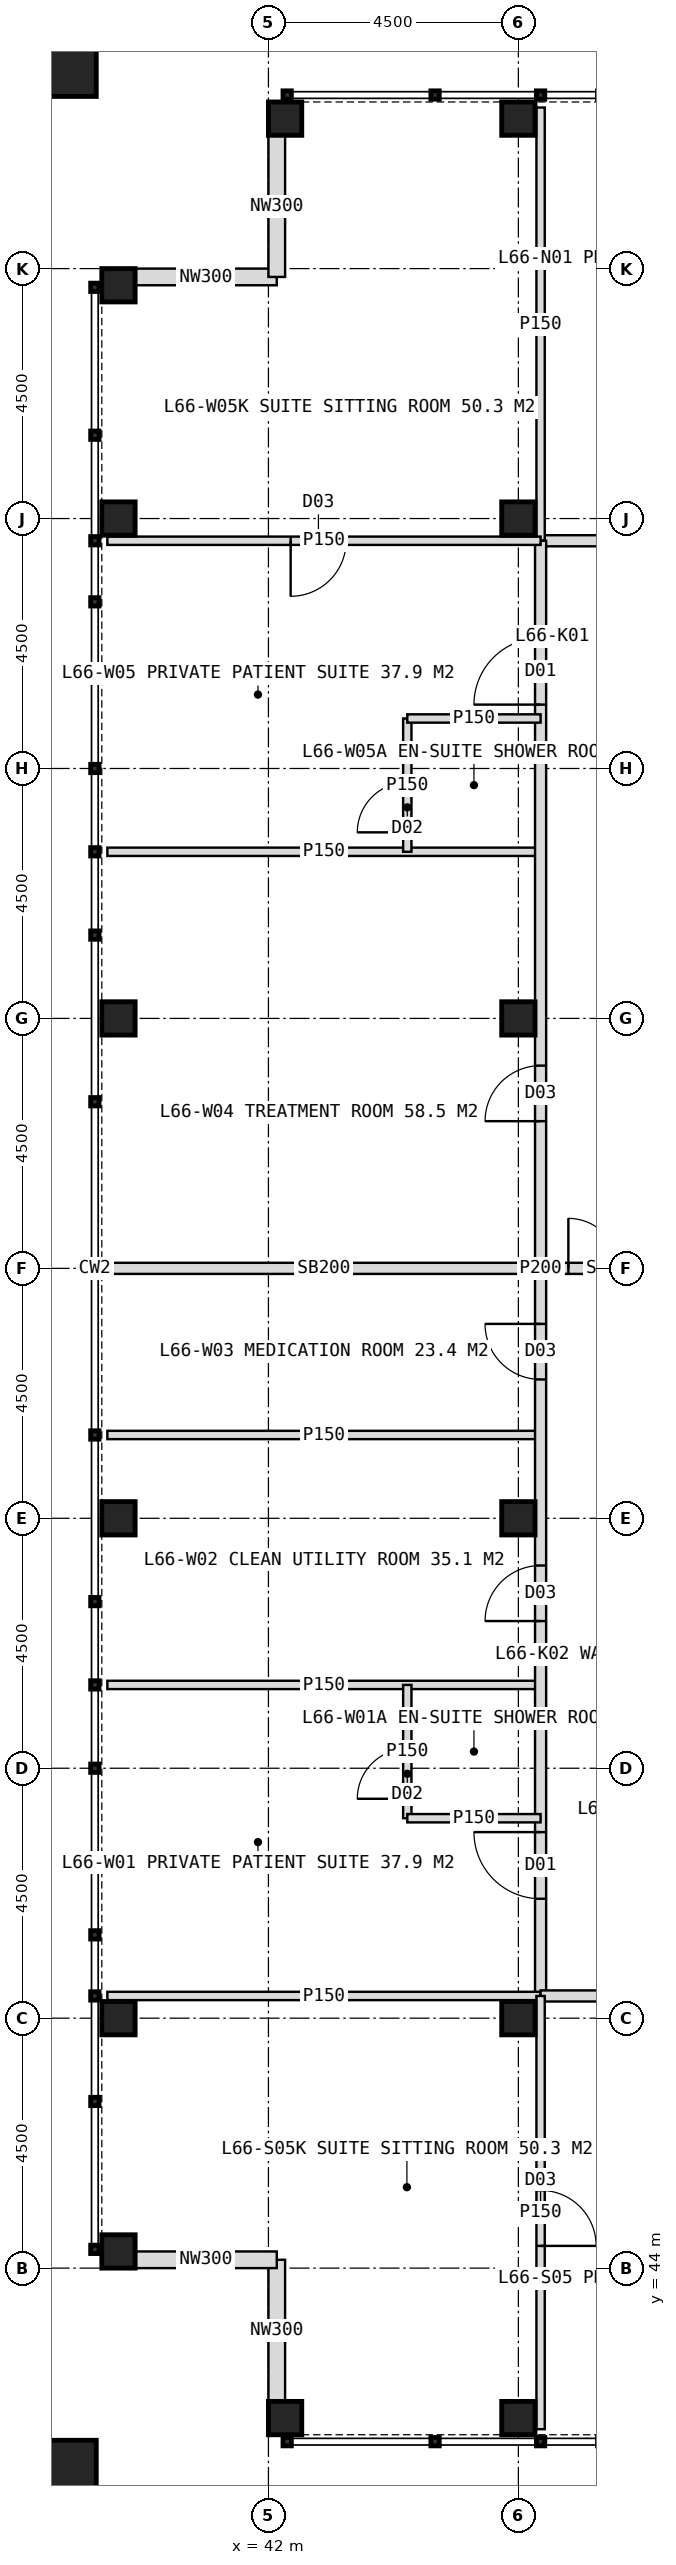
"""IFC4 building model, lengths in metres.
Left out: names, types, materials, properties, quantities, classifications, styles, units other than length and angle.
Written with IfcOpenShell. Run it as: python <this file> out.ifc"""

import sys

from ifc_helpers import new_model, si_unit, direction, frame, frame_2d, origin, origin_2d, place, context, subcontext, project, spatial, rectangle, hollow_rectangle, extrude, element, fill, save


model = new_model("IFC4")
c1 = context("Model", 3, precision=1e-05, world=origin(), true_north=direction((0.0, 1.0)))
c2 = subcontext(c1, "Body", "Model", "MODEL_VIEW")
j1 = project(units=[si_unit("LENGTHUNIT", "METRE"), si_unit("PLANEANGLEUNIT", "RADIAN")], contexts=[c1])
p1 = place(None, origin())
s1 = spatial("IfcSite", under=j1, at=p1, CompositionType="ELEMENT")
p2 = place(p1, origin())
s2 = spatial("IfcBuilding", under=s1, at=p2, CompositionType="ELEMENT")
p3 = place(p2, frame((0.0, 0.0, 274.0)))
s3 = spatial("IfcBuildingStorey", under=s2, at=p3, CompositionType="ELEMENT", Elevation=274.0)
for number, where, z_axis, x_axis in (
    (1, (46.5, 48.5, 0.0), (0.0, 0.0, 1.0), (1.0, 0.0, 0.0)),
    (2, (46.5, 75.5, 0.0), (0.0, 0.0, 1.0), (1.0, 0.0, 0.0)),
    (3, (46.5, 57.5, 0.0), (0.0, 0.0, 1.0), (1.0, 0.0, 0.0)),
    (4, (46.5, 66.5, 0.0), (0.0, 0.0, 1.0), (1.0, 0.0, 0.0)),
    (5, (42.3, 41.3, 0.0), (0.0, 0.0, 1.0), (1.0, 0.0, 0.0)),
    (6, (42.3, 82.7, 0.0), (0.0, 0.0, 1.0), (1.0, 0.0, 0.0)),
    (7, (39.3, 44.3, 0.0), (0.0, 0.0, 1.0), (1.0, 0.0, 0.0)),
    (8, (46.5, 41.3, 0.0), (0.0, 0.0, 1.0), (1.0, 0.0, 0.0)),
    (9, (46.5, 82.7, 0.0), (0.0, 0.0, 1.0), (1.0, 0.0, 0.0)),
    (10, (39.3, 48.5, 0.0), (0.0, 0.0, 1.0), (1.0, 0.0, 0.0)),
    (11, (39.3, 57.5, 0.0), (0.0, 0.0, 1.0), (1.0, 0.0, 0.0)),
    (12, (39.3, 66.5, 0.0), (0.0, 0.0, 1.0), (1.0, 0.0, 0.0)),
    (13, (39.3, 75.5, 0.0), (0.0, 0.0, 1.0), (1.0, 0.0, 0.0)),
    (14, (39.3, 79.7, 0.0), (0.0, 0.0, 1.0), (1.0, 0.0, 0.0)),
):
    element("IfcColumn", number, at=place(p3, frame(where, z_axis=z_axis, x_axis=x_axis)), inside=s3, PredefinedType="COLUMN", context=c2, shape_type="SweptSolid", body=[
        extrude(hollow_rectangle(XDim=0.6, YDim=0.6, WallThickness=0.04, at=origin_2d()), origin(), (0.0, 0.0, 1.0), 4.0),
    ])
for number, where, z_axis, x_axis in (
    (15, (38.4, 40.4, 0.0), (0.0, 0.0, 1.0), (1.0, 0.0, 0.0)),
    (16, (38.4, 83.6, 0.0), (0.0, 0.0, 1.0), (1.0, 0.0, 0.0)),
):
    element("IfcColumn", number, at=place(p3, frame(where, z_axis=z_axis, x_axis=x_axis)), inside=s3, PredefinedType="COLUMN", context=c2, shape_type="SweptSolid", body=[
        extrude(hollow_rectangle(XDim=1.0, YDim=1.0, WallThickness=0.06, at=origin_2d()), origin(), (0.0, 0.0, 1.0), 4.0),
    ])
for number, where, z_axis, x_axis in (
    (17, (39.6, 79.85, 0.0), (0.0, 0.0, 1.0), (1.0, 0.0, 0.0)),
    (18, (42.15, 79.85, 0.0), (0.0, 0.0, 1.0), (0.0, 1.0, 0.0)),
    (19, (42.15, 41.6, 0.0), (0.0, 0.0, 1.0), (0.0, 1.0, 0.0)),
    (20, (42.15, 44.15, 0.0), (0.0, 0.0, 1.0), (-1.0, 0.0, 0.0)),
):
    element("IfcWall", number, at=place(p3, frame(where, z_axis=z_axis, x_axis=x_axis)), inside=s3, PredefinedType="ELEMENTEDWALL", context=c2, shape_type="SweptSolid", body=[
        extrude(rectangle(XDim=2.55, YDim=0.3, at=frame_2d((1.275, 0.0))), origin(), (0.0, 0.0, 1.0), 2.95),
    ])
p4 = place(p3, frame((46.9, 75.1, 0.0), z_axis=(0.0, 0.0, 1.0), x_axis=(1.0, 0.0, 0.0)))
e21 = element("IfcWall", 21, at=p4, inside=s3, PredefinedType="PARTITIONING", context=c2, shape_type="SweptSolid", body=[
    extrude(rectangle(XDim=26.2, YDim=0.2, at=frame_2d((13.1, 0.0))), origin(), (0.0, 0.0, 1.0), 3.75),
])
p5 = place(p4, frame((1.75, 0.0, 0.0)))
e22 = element("IfcOpeningElement", 22, at=p5, cuts=e21, PredefinedType="OPENING", context=c2, shape_type="SweptSolid", body=[
    extrude(rectangle(XDim=1.2, YDim=2.2, at=frame_2d((0.6, 1.1))), frame((0.0, 0.11, 0.0), z_axis=(0.0, -1.0, 0.0), x_axis=(1.0, 0.0, 0.0)), (0.0, 0.0, 1.0), 0.22),
])
p6 = place(p4, frame((6.75, 0.0, 0.0)))
e23 = element("IfcOpeningElement", 23, at=p6, cuts=e21, PredefinedType="OPENING", context=c2, shape_type="SweptSolid", body=[
    extrude(rectangle(XDim=1.0, YDim=2.1, at=frame_2d((0.5, 1.05))), frame((0.0, 0.11, 0.0), z_axis=(0.0, -1.0, 0.0), x_axis=(1.0, 0.0, 0.0)), (0.0, 0.0, 1.0), 0.22),
])
p7 = place(p4, frame((12.75, 0.0, 0.0)))
e24 = element("IfcOpeningElement", 24, at=p7, cuts=e21, PredefinedType="OPENING", context=c2, shape_type="SweptSolid", body=[
    extrude(rectangle(XDim=1.2, YDim=2.2, at=frame_2d((0.6, 1.1))), frame((0.0, 0.11, 0.0), z_axis=(0.0, -1.0, 0.0), x_axis=(1.0, 0.0, 0.0)), (0.0, 0.0, 1.0), 0.22),
])
p8 = place(p4, frame((18.45, 0.0, 0.0)))
e25 = element("IfcOpeningElement", 25, at=p8, cuts=e21, PredefinedType="OPENING", context=c2, shape_type="SweptSolid", body=[
    extrude(rectangle(XDim=1.0, YDim=2.1, at=frame_2d((0.5, 1.05))), frame((0.0, 0.11, 0.0), z_axis=(0.0, -1.0, 0.0), x_axis=(1.0, 0.0, 0.0)), (0.0, 0.0, 1.0), 0.22),
])
p9 = place(p4, frame((23.25, 0.0, 0.0)))
e26 = element("IfcOpeningElement", 26, at=p9, cuts=e21, PredefinedType="OPENING", context=c2, shape_type="SweptSolid", body=[
    extrude(rectangle(XDim=1.2, YDim=2.2, at=frame_2d((0.6, 1.1))), frame((0.0, 0.11, 0.0), z_axis=(0.0, -1.0, 0.0), x_axis=(1.0, 0.0, 0.0)), (0.0, 0.0, 1.0), 0.22),
])
for number, where, z_axis, x_axis in (
    (27, (46.9, 75.1, 0.0), (0.0, 0.0, 1.0), (0.0, 1.0, 0.0)),
    (28, (46.9, 54.5, 0.0), (0.0, 0.0, 1.0), (-1.0, 0.0, 0.0)),
    (29, (46.9, 59.0, 0.0), (0.0, 0.0, 1.0), (-1.0, 0.0, 0.0)),
):
    element("IfcWall", number, at=place(p3, frame(where, z_axis=z_axis, x_axis=x_axis)), inside=s3, PredefinedType="PARTITIONING", context=c2, shape_type="SweptSolid", body=[
        extrude(rectangle(XDim=7.8, YDim=0.15, at=frame_2d((3.9, 0.0))), origin(), (0.0, 0.0, 1.0), 3.75),
    ])
p10 = place(p3, frame((46.9, 62.0, 0.0), z_axis=(0.0, 0.0, 1.0), x_axis=(-1.0, 0.0, 0.0)))
e30 = element("IfcWall", 30, at=p10, inside=s3, PredefinedType="SOLIDWALL", context=c2, shape_type="SweptSolid", body=[
    extrude(rectangle(XDim=7.8, YDim=0.2, at=frame_2d((3.9, 0.0))), origin(), (0.0, 0.0, 1.0), 2.75),
])
p11 = place(p3, frame((46.9, 69.5, 0.0), z_axis=(0.0, 0.0, 1.0), x_axis=(-1.0, 0.0, 0.0)))
e31 = element("IfcWall", 31, at=p11, inside=s3, PredefinedType="PARTITIONING", context=c2, shape_type="SweptSolid", body=[
    extrude(rectangle(XDim=7.8, YDim=0.15, at=frame_2d((3.9, 0.0))), origin(), (0.0, 0.0, 1.0), 3.75),
])
p12 = place(p3, frame((46.9, 48.9, 0.0), z_axis=(0.0, 0.0, 1.0), x_axis=(0.0, 1.0, 0.0)))
e32 = element("IfcWall", 32, at=p12, inside=s3, PredefinedType="PARTITIONING", context=c2, shape_type="SweptSolid", body=[
    extrude(rectangle(XDim=26.2, YDim=0.2, at=frame_2d((13.1, 0.0))), origin(), (0.0, 0.0, 1.0), 3.75),
])
p13 = place(p12, frame((1.75, 0.0, 0.0)))
e33 = element("IfcOpeningElement", 33, at=p13, cuts=e32, PredefinedType="OPENING", context=c2, shape_type="SweptSolid", body=[
    extrude(rectangle(XDim=1.2, YDim=2.2, at=frame_2d((0.6, 1.1))), frame((0.0, 0.11, 0.0), z_axis=(0.0, -1.0, 0.0), x_axis=(1.0, 0.0, 0.0)), (0.0, 0.0, 1.0), 0.22),
])
p14 = place(p12, frame((6.75, 0.0, 0.0)))
e34 = element("IfcOpeningElement", 34, at=p14, cuts=e32, PredefinedType="OPENING", context=c2, shape_type="SweptSolid", body=[
    extrude(rectangle(XDim=1.0, YDim=2.1, at=frame_2d((0.5, 1.05))), frame((0.0, 0.11, 0.0), z_axis=(0.0, -1.0, 0.0), x_axis=(1.0, 0.0, 0.0)), (0.0, 0.0, 1.0), 0.22),
])
p15 = place(p12, frame((11.1, 0.0, 0.0)))
e35 = element("IfcOpeningElement", 35, at=p15, cuts=e32, PredefinedType="OPENING", context=c2, shape_type="SweptSolid", body=[
    extrude(rectangle(XDim=1.0, YDim=2.1, at=frame_2d((0.5, 1.05))), frame((0.0, 0.11, 0.0), z_axis=(0.0, -1.0, 0.0), x_axis=(1.0, 0.0, 0.0)), (0.0, 0.0, 1.0), 0.22),
])
p16 = place(p12, frame((15.75, 0.0, 0.0)))
e36 = element("IfcOpeningElement", 36, at=p16, cuts=e32, PredefinedType="OPENING", context=c2, shape_type="SweptSolid", body=[
    extrude(rectangle(XDim=1.0, YDim=2.1, at=frame_2d((0.5, 1.05))), frame((0.0, 0.11, 0.0), z_axis=(0.0, -1.0, 0.0), x_axis=(1.0, 0.0, 0.0)), (0.0, 0.0, 1.0), 0.22),
])
p17 = place(p12, frame((23.25, 0.0, 0.0)))
e37 = element("IfcOpeningElement", 37, at=p17, cuts=e32, PredefinedType="OPENING", context=c2, shape_type="SweptSolid", body=[
    extrude(rectangle(XDim=1.2, YDim=2.2, at=frame_2d((0.6, 1.1))), frame((0.0, 0.11, 0.0), z_axis=(0.0, -1.0, 0.0), x_axis=(1.0, 0.0, 0.0)), (0.0, 0.0, 1.0), 0.22),
])
p18 = place(p3, frame((46.9, 48.9, 0.0), z_axis=(0.0, 0.0, 1.0), x_axis=(-1.0, 0.0, 0.0)))
e38 = element("IfcWall", 38, at=p18, inside=s3, PredefinedType="PARTITIONING", context=c2, shape_type="SweptSolid", body=[
    extrude(rectangle(XDim=7.8, YDim=0.15, at=frame_2d((3.9, 0.0))), origin(), (0.0, 0.0, 1.0), 3.75),
])
p19 = place(p3, frame((44.5, 52.1, 0.0), z_axis=(0.0, 0.0, 1.0), x_axis=(0.0, 1.0, 0.0)))
e39 = element("IfcWall", 39, at=p19, inside=s3, PredefinedType="PARTITIONING", context=c2, shape_type="SweptSolid", body=[
    extrude(rectangle(XDim=2.4, YDim=0.15, at=frame_2d((1.2, 0.0))), origin(), (0.0, 0.0, 1.0), 3.75),
])
p20 = place(p19, frame((0.35, 0.0, 0.0)))
e40 = element("IfcOpeningElement", 40, at=p20, cuts=e39, PredefinedType="OPENING", context=c2, shape_type="SweptSolid", body=[
    extrude(rectangle(XDim=0.9, YDim=2.1, at=frame_2d((0.45, 1.05))), frame((0.0, 0.085, 0.0), z_axis=(0.0, -1.0, 0.0), x_axis=(1.0, 0.0, 0.0)), (0.0, 0.0, 1.0), 0.17),
])
p21 = place(p3, frame((46.9, 52.1, 0.0), z_axis=(0.0, 0.0, 1.0), x_axis=(-1.0, 0.0, 0.0)))
e41 = element("IfcWall", 41, at=p21, inside=s3, PredefinedType="PARTITIONING", context=c2, shape_type="SweptSolid", body=[
    extrude(rectangle(XDim=2.4, YDim=0.15, at=frame_2d((1.2, 0.0))), origin(), (0.0, 0.0, 1.0), 3.75),
])
p22 = place(p3, frame((46.9, 75.1, 0.0), z_axis=(0.0, 0.0, 1.0), x_axis=(-1.0, 0.0, 0.0)))
e42 = element("IfcWall", 42, at=p22, inside=s3, PredefinedType="PARTITIONING", context=c2, shape_type="SweptSolid", body=[
    extrude(rectangle(XDim=7.8, YDim=0.15, at=frame_2d((3.9, 0.0))), origin(), (0.0, 0.0, 1.0), 3.75),
])
p23 = place(p22, frame((3.5, 0.0, 0.0)))
e43 = element("IfcOpeningElement", 43, at=p23, cuts=e42, PredefinedType="OPENING", context=c2, shape_type="SweptSolid", body=[
    extrude(rectangle(XDim=1.0, YDim=2.1, at=frame_2d((0.5, 1.05))), frame((0.0, 0.085, 0.0), z_axis=(0.0, -1.0, 0.0), x_axis=(1.0, 0.0, 0.0)), (0.0, 0.0, 1.0), 0.17),
])
p24 = place(p3, frame((44.5, 69.5, 0.0), z_axis=(0.0, 0.0, 1.0), x_axis=(0.0, 1.0, 0.0)))
e44 = element("IfcWall", 44, at=p24, inside=s3, PredefinedType="PARTITIONING", context=c2, shape_type="SweptSolid", body=[
    extrude(rectangle(XDim=2.4, YDim=0.15, at=frame_2d((1.2, 0.0))), origin(), (0.0, 0.0, 1.0), 3.75),
])
p25 = place(p24, frame((0.35, 0.0, 0.0)))
e45 = element("IfcOpeningElement", 45, at=p25, cuts=e44, PredefinedType="OPENING", context=c2, shape_type="SweptSolid", body=[
    extrude(rectangle(XDim=0.9, YDim=2.1, at=frame_2d((0.45, 1.05))), frame((0.0, 0.085, 0.0), z_axis=(0.0, -1.0, 0.0), x_axis=(1.0, 0.0, 0.0)), (0.0, 0.0, 1.0), 0.17),
])
p26 = place(p3, frame((46.9, 71.9, 0.0), z_axis=(0.0, 0.0, 1.0), x_axis=(-1.0, 0.0, 0.0)))
e46 = element("IfcWall", 46, at=p26, inside=s3, PredefinedType="PARTITIONING", context=c2, shape_type="SweptSolid", body=[
    extrude(rectangle(XDim=2.4, YDim=0.15, at=frame_2d((1.2, 0.0))), origin(), (0.0, 0.0, 1.0), 3.75),
])
p27 = place(p3, frame((73.1, 48.9, 0.0), z_axis=(0.0, 0.0, 1.0), x_axis=(-1.0, 0.0, 0.0)))
e47 = element("IfcWall", 47, at=p27, inside=s3, PredefinedType="PARTITIONING", context=c2, shape_type="SweptSolid", body=[
    extrude(rectangle(XDim=26.2, YDim=0.2, at=frame_2d((13.1, 0.0))), origin(), (0.0, 0.0, 1.0), 3.75),
])
p28 = place(p27, frame((1.55, 0.0, 0.0)))
e48 = element("IfcOpeningElement", 48, at=p28, cuts=e47, PredefinedType="OPENING", context=c2, shape_type="SweptSolid", body=[
    extrude(rectangle(XDim=1.0, YDim=2.1, at=frame_2d((0.5, 1.05))), frame((0.0, 0.11, 0.0), z_axis=(0.0, -1.0, 0.0), x_axis=(1.0, 0.0, 0.0)), (0.0, 0.0, 1.0), 0.22),
])
p29 = place(p27, frame((6.75, 0.0, 0.0)))
e49 = element("IfcOpeningElement", 49, at=p29, cuts=e47, PredefinedType="OPENING", context=c2, shape_type="SweptSolid", body=[
    extrude(rectangle(XDim=1.0, YDim=2.1, at=frame_2d((0.5, 1.05))), frame((0.0, 0.11, 0.0), z_axis=(0.0, -1.0, 0.0), x_axis=(1.0, 0.0, 0.0)), (0.0, 0.0, 1.0), 0.22),
])
p30 = place(p27, frame((14.25, 0.0, 0.0)))
e50 = element("IfcOpeningElement", 50, at=p30, cuts=e47, PredefinedType="OPENING", context=c2, shape_type="SweptSolid", body=[
    extrude(rectangle(XDim=1.2, YDim=2.2, at=frame_2d((0.6, 1.1))), frame((0.0, 0.11, 0.0), z_axis=(0.0, -1.0, 0.0), x_axis=(1.0, 0.0, 0.0)), (0.0, 0.0, 1.0), 0.22),
])
p31 = place(p27, frame((18.45, 0.0, 0.0)))
e51 = element("IfcOpeningElement", 51, at=p31, cuts=e47, PredefinedType="OPENING", context=c2, shape_type="SweptSolid", body=[
    extrude(rectangle(XDim=1.0, YDim=2.1, at=frame_2d((0.5, 1.05))), frame((0.0, 0.11, 0.0), z_axis=(0.0, -1.0, 0.0), x_axis=(1.0, 0.0, 0.0)), (0.0, 0.0, 1.0), 0.22),
])
p32 = place(p27, frame((23.25, 0.0, 0.0)))
e52 = element("IfcOpeningElement", 52, at=p32, cuts=e47, PredefinedType="OPENING", context=c2, shape_type="SweptSolid", body=[
    extrude(rectangle(XDim=1.2, YDim=2.2, at=frame_2d((0.6, 1.1))), frame((0.0, 0.11, 0.0), z_axis=(0.0, -1.0, 0.0), x_axis=(1.0, 0.0, 0.0)), (0.0, 0.0, 1.0), 0.22),
])
p33 = place(p3, frame((46.9, 48.9, 0.0), z_axis=(0.0, 0.0, 1.0), x_axis=(0.0, -1.0, 0.0)))
e53 = element("IfcWall", 53, at=p33, inside=s3, PredefinedType="PARTITIONING", context=c2, shape_type="SweptSolid", body=[
    extrude(rectangle(XDim=7.8, YDim=0.15, at=frame_2d((3.9, 0.0))), origin(), (0.0, 0.0, 1.0), 3.75),
])
p34 = place(p33, frame((3.5, 0.0, 0.0)))
e54 = element("IfcOpeningElement", 54, at=p34, cuts=e53, PredefinedType="OPENING", context=c2, shape_type="SweptSolid", body=[
    extrude(rectangle(XDim=1.0, YDim=2.1, at=frame_2d((0.5, 1.05))), frame((0.0, 0.085, 0.0), z_axis=(0.0, -1.0, 0.0), x_axis=(1.0, 0.0, 0.0)), (0.0, 0.0, 1.0), 0.17),
])
p35 = place(p3, frame((49.5, 62.0, 0.0), z_axis=(0.0, 0.0, 1.0), x_axis=(-1.0, 0.0, 0.0)))
e55 = element("IfcWall", 55, at=p35, inside=s3, PredefinedType="SOLIDWALL", context=c2, shape_type="SweptSolid", body=[
    extrude(rectangle(XDim=2.6, YDim=0.2, at=frame_2d((1.3, 0.0))), origin(), (0.0, 0.0, 1.0), 2.75),
])
p36 = place(p35, frame((0.3, 0.0, 0.0)))
e56 = element("IfcOpeningElement", 56, at=p36, cuts=e55, PredefinedType="OPENING", context=c2, shape_type="SweptSolid", body=[
    extrude(rectangle(XDim=1.8, YDim=2.2, at=frame_2d((0.9, 1.1))), frame((0.0, 0.11, 0.0), z_axis=(0.0, -1.0, 0.0), x_axis=(1.0, 0.0, 0.0)), (0.0, 0.0, 1.0), 0.22),
])
p37 = place(p13, origin())
e57 = element("IfcDoor", 57, at=p37, inside=s3, OperationType="SINGLE_SWING_RIGHT", PredefinedType="DOOR", context=c2, shape_type="SweptSolid", body=[
    extrude(rectangle(XDim=1.2, YDim=2.2, at=frame_2d((0.6, 1.1))), frame((0.0, 0.025, 0.0), z_axis=(0.0, -1.0, 0.0), x_axis=(1.0, 0.0, 0.0)), (0.0, 0.0, 1.0), 0.05),
])
fill(e33, e57)
p38 = place(p20, origin())
e58 = element("IfcDoor", 58, at=p38, inside=s3, OperationType="SINGLE_SWING_LEFT", PredefinedType="DOOR", context=c2, shape_type="SweptSolid", body=[
    extrude(rectangle(XDim=0.9, YDim=2.1, at=frame_2d((0.45, 1.05))), frame((0.0, 0.025, 0.0), z_axis=(0.0, -1.0, 0.0), x_axis=(1.0, 0.0, 0.0)), (0.0, 0.0, 1.0), 0.05),
])
fill(e40, e58)
p39 = place(p14, origin())
e59 = element("IfcDoor", 59, at=p39, inside=s3, OperationType="SINGLE_SWING_LEFT", PredefinedType="DOOR", context=c2, shape_type="SweptSolid", body=[
    extrude(rectangle(XDim=1.0, YDim=2.1, at=frame_2d((0.5, 1.05))), frame((0.0, 0.025, 0.0), z_axis=(0.0, -1.0, 0.0), x_axis=(1.0, 0.0, 0.0)), (0.0, 0.0, 1.0), 0.05),
])
fill(e34, e59)
p40 = place(p15, origin())
e60 = element("IfcDoor", 60, at=p40, inside=s3, OperationType="SINGLE_SWING_RIGHT", PredefinedType="DOOR", context=c2, shape_type="SweptSolid", body=[
    extrude(rectangle(XDim=1.0, YDim=2.1, at=frame_2d((0.5, 1.05))), frame((0.0, 0.025, 0.0), z_axis=(0.0, -1.0, 0.0), x_axis=(1.0, 0.0, 0.0)), (0.0, 0.0, 1.0), 0.05),
])
fill(e35, e60)
p41 = place(p16, origin())
e61 = element("IfcDoor", 61, at=p41, inside=s3, OperationType="SINGLE_SWING_LEFT", PredefinedType="DOOR", context=c2, shape_type="SweptSolid", body=[
    extrude(rectangle(XDim=1.0, YDim=2.1, at=frame_2d((0.5, 1.05))), frame((0.0, 0.025, 0.0), z_axis=(0.0, -1.0, 0.0), x_axis=(1.0, 0.0, 0.0)), (0.0, 0.0, 1.0), 0.05),
])
fill(e36, e61)
p42 = place(p23, origin())
e62 = element("IfcDoor", 62, at=p42, inside=s3, OperationType="SINGLE_SWING_RIGHT", PredefinedType="DOOR", context=c2, shape_type="SweptSolid", body=[
    extrude(rectangle(XDim=1.0, YDim=2.1, at=frame_2d((0.5, 1.05))), frame((0.0, 0.025, 0.0), z_axis=(0.0, -1.0, 0.0), x_axis=(1.0, 0.0, 0.0)), (0.0, 0.0, 1.0), 0.05),
])
fill(e43, e62)
p43 = place(p17, origin())
e63 = element("IfcDoor", 63, at=p43, inside=s3, OperationType="SINGLE_SWING_LEFT", PredefinedType="DOOR", context=c2, shape_type="SweptSolid", body=[
    extrude(rectangle(XDim=1.2, YDim=2.2, at=frame_2d((0.6, 1.1))), frame((0.0, 0.025, 0.0), z_axis=(0.0, -1.0, 0.0), x_axis=(1.0, 0.0, 0.0)), (0.0, 0.0, 1.0), 0.05),
])
fill(e37, e63)
p44 = place(p25, origin())
e64 = element("IfcDoor", 64, at=p44, inside=s3, OperationType="SINGLE_SWING_LEFT", PredefinedType="DOOR", context=c2, shape_type="SweptSolid", body=[
    extrude(rectangle(XDim=0.9, YDim=2.1, at=frame_2d((0.45, 1.05))), frame((0.0, 0.025, 0.0), z_axis=(0.0, -1.0, 0.0), x_axis=(1.0, 0.0, 0.0)), (0.0, 0.0, 1.0), 0.05),
])
fill(e45, e64)
p45 = place(p34, origin())
e65 = element("IfcDoor", 65, at=p45, inside=s3, OperationType="SINGLE_SWING_RIGHT", PredefinedType="DOOR", context=c2, shape_type="SweptSolid", body=[
    extrude(rectangle(XDim=1.0, YDim=2.1, at=frame_2d((0.5, 1.05))), frame((0.0, 0.025, 0.0), z_axis=(0.0, -1.0, 0.0), x_axis=(1.0, 0.0, 0.0)), (0.0, 0.0, 1.0), 0.05),
])
fill(e54, e65)
p46 = place(p36, origin())
e66 = element("IfcDoor", 66, at=p46, inside=s3, OperationType="DOUBLE_DOOR_DOUBLE_SWING", PredefinedType="DOOR", context=c2, shape_type="SweptSolid", body=[
    extrude(rectangle(XDim=1.8, YDim=2.2, at=frame_2d((0.9, 1.1))), frame((0.0, 0.025, 0.0), z_axis=(0.0, -1.0, 0.0), x_axis=(1.0, 0.0, 0.0)), (0.0, 0.0, 1.0), 0.05),
])
fill(e56, e66)
save(model, sys.argv[1])
